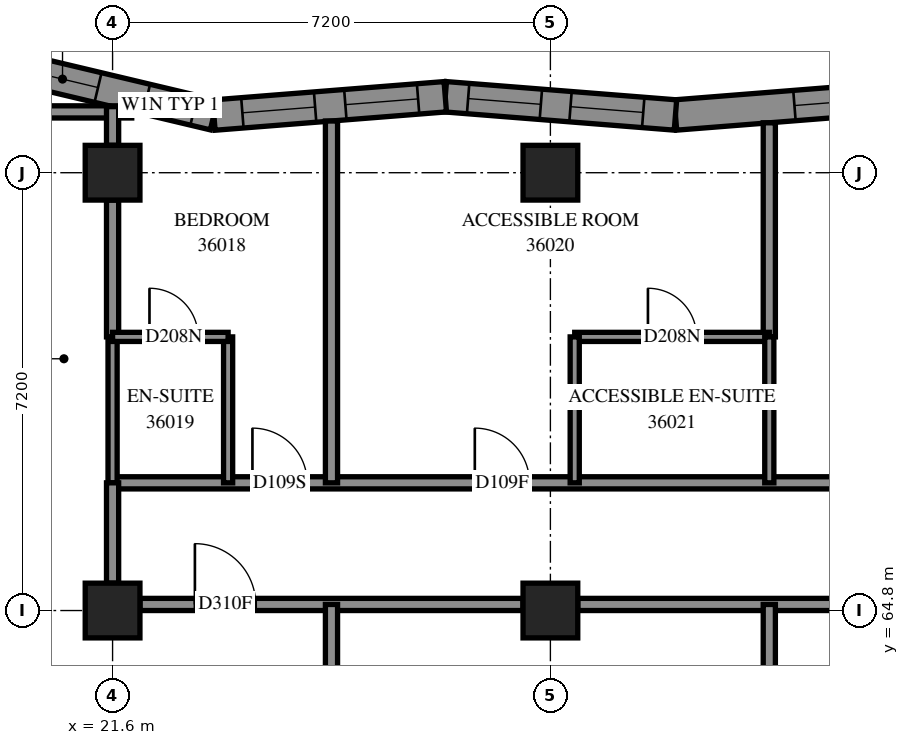
"""IFC4 building model, lengths in metres.
Left out: names, types, materials, properties, quantities, classifications, styles, units other than length and angle.
Written with IfcOpenShell. Run it as: python <this file> out.ifc"""

import sys

from ifc_helpers import new_model, si_unit, direction, frame, frame_2d, origin, origin_2d, place, context, subcontext, project, spatial, polyline, rectangle, outline, extrude, element, fill, save


model = new_model("IFC4")
c1 = context("Model", 3, precision=1e-05, world=origin(), true_north=direction((0.0, 1.0)))
c2 = subcontext(c1, "Body", "Model", "MODEL_VIEW")
j1 = project(units=[si_unit("LENGTHUNIT", "METRE"), si_unit("PLANEANGLEUNIT", "RADIAN")], contexts=[c1])
p1 = place(None, origin())
s1 = spatial("IfcSite", under=j1, at=p1, CompositionType="ELEMENT")
p2 = place(p1, origin())
s2 = spatial("IfcBuilding", under=s1, at=p2, CompositionType="ELEMENT")
p3 = place(p2, frame((0.0, 0.0, 135.4)))
s3 = spatial("IfcBuildingStorey", under=s2, at=p3, CompositionType="ELEMENT", Elevation=135.4)
for number, where, z_axis, x_axis in (
    (1, (21.6, 64.8, 0.0), (0.0, 0.0, 1.0), (1.0, 0.0, 0.0)),
    (2, (21.6, 72.0, 0.0), (0.0, 0.0, 1.0), (1.0, 0.0, 0.0)),
    (3, (28.8, 64.8, 0.0), (0.0, 0.0, 1.0), (1.0, 0.0, 0.0)),
    (4, (28.8, 72.0, 0.0), (0.0, 0.0, 1.0), (1.0, 0.0, 0.0)),
):
    element("IfcColumn", number, at=place(p3, frame(where, z_axis=z_axis, x_axis=x_axis)), inside=s3, PredefinedType="COLUMN", context=c2, shape_type="SweptSolid", body=[
        extrude(rectangle(XDim=0.9, YDim=0.9, at=origin_2d()), origin(), (0.0, 0.0, 1.0), 3.1),
    ])
p4 = place(p3, frame((34.642, 73.249, 0.0), z_axis=(0.0, 0.0, 1.0), x_axis=(-0.9968746163, -0.078999996, 0.0)))
e5 = element("IfcWall", 5, at=p4, inside=s3, PredefinedType="SOLIDWALL", context=c2, shape_type="SweptSolid", body=[
    extrude(outline(polyline([(-0.02, -0.25), (3.778, -0.25), (3.817, 0.25), (0.02, 0.25), (-0.02, -0.25)])), origin(), (0.0, 0.0, 1.0), 3.1),
])
p5 = place(p4, frame((0.635, 0.0, 0.45)))
e6 = element("IfcOpeningElement", 6, at=p5, cuts=e5, PredefinedType="OPENING", context=c2, shape_type="SweptSolid", body=[
    extrude(rectangle(XDim=1.2, YDim=2.5, at=frame_2d((0.6, 1.25))), frame((0.0, 0.26, 0.0), z_axis=(0.0, -1.0, 0.0), x_axis=(1.0, 0.0, 0.0)), (0.0, 0.0, 1.0), 0.52),
])
p6 = place(p3, frame((30.857, 72.949, 0.0), z_axis=(0.0, 0.0, 1.0), x_axis=(-0.9968747806, 0.0789979222, 0.0)))
e7 = element("IfcWall", 7, at=p6, inside=s3, PredefinedType="SOLIDWALL", context=c2, shape_type="SweptSolid", body=[
    extrude(outline(polyline([(0.02, -0.25), (3.817, -0.25), (3.778, 0.25), (-0.02, 0.25), (0.02, -0.25)])), origin(), (0.0, 0.0, 1.0), 3.1),
])
p7 = place(p6, frame((0.532, 0.0, 0.45)))
e8 = element("IfcOpeningElement", 8, at=p7, cuts=e7, PredefinedType="OPENING", context=c2, shape_type="SweptSolid", body=[
    extrude(rectangle(XDim=1.2, YDim=2.5, at=frame_2d((0.6, 1.25))), frame((0.0, 0.26, 0.0), z_axis=(0.0, -1.0, 0.0), x_axis=(1.0, 0.0, 0.0)), (0.0, 0.0, 1.0), 0.52),
])
p8 = place(p6, frame((2.22, 0.0, 0.45)))
e9 = element("IfcOpeningElement", 9, at=p8, cuts=e7, PredefinedType="OPENING", context=c2, shape_type="SweptSolid", body=[
    extrude(rectangle(XDim=1.2, YDim=2.5, at=frame_2d((0.6, 1.25))), frame((0.0, 0.26, 0.0), z_axis=(0.0, -1.0, 0.0), x_axis=(1.0, 0.0, 0.0)), (0.0, 0.0, 1.0), 0.52),
])
p9 = place(p3, frame((27.071, 73.249, 0.0), z_axis=(0.0, 0.0, 1.0), x_axis=(-0.9968755515, -0.0789881945, 0.0)))
e10 = element("IfcWall", 10, at=p9, inside=s3, PredefinedType="SOLIDWALL", context=c2, shape_type="SweptSolid", body=[
    extrude(outline(polyline([(-0.02, -0.25), (3.778, -0.25), (3.856, 0.25), (0.02, 0.25), (-0.02, -0.25)])), origin(), (0.0, 0.0, 1.0), 3.1),
])
p10 = place(p9, frame((0.449, 0.0, 0.45)))
e11 = element("IfcOpeningElement", 11, at=p10, cuts=e10, PredefinedType="OPENING", context=c2, shape_type="SweptSolid", body=[
    extrude(rectangle(XDim=1.2, YDim=2.5, at=frame_2d((0.6, 1.25))), frame((0.0, 0.26, 0.0), z_axis=(0.0, -1.0, 0.0), x_axis=(1.0, 0.0, 0.0)), (0.0, 0.0, 1.0), 0.52),
])
p11 = place(p9, frame((2.147, 0.0, 0.45)))
e12 = element("IfcOpeningElement", 12, at=p11, cuts=e10, PredefinedType="OPENING", context=c2, shape_type="SweptSolid", body=[
    extrude(rectangle(XDim=1.2, YDim=2.5, at=frame_2d((0.6, 1.25))), frame((0.0, 0.26, 0.0), z_axis=(0.0, -1.0, 0.0), x_axis=(1.0, 0.0, 0.0)), (0.0, 0.0, 1.0), 0.52),
])
p12 = place(p3, frame((23.266, 72.948, 0.0), z_axis=(0.0, 0.0, 1.0), x_axis=(-0.9728851289, 0.2312888368, 0.0)))
e13 = element("IfcWall", 13, at=p12, inside=s3, PredefinedType="SOLIDWALL", context=c2, shape_type="SweptSolid", body=[
    extrude(outline(polyline([(0.039, -0.25), (3.93, -0.25), (3.298, 0.25), (-0.039, 0.25), (0.039, -0.25)])), origin(), (0.0, 0.0, 1.0), 3.1),
])
p13 = place(p12, frame((0.338, 0.0, 0.45)))
e14 = element("IfcOpeningElement", 14, at=p13, cuts=e13, PredefinedType="OPENING", context=c2, shape_type="SweptSolid", body=[
    extrude(rectangle(XDim=0.8, YDim=2.5, at=frame_2d((0.4, 1.25))), frame((0.0, 0.26, 0.0), z_axis=(0.0, -1.0, 0.0), x_axis=(1.0, 0.0, 0.0)), (0.0, 0.0, 1.0), 0.52),
])
p14 = place(p12, frame((1.959, 0.0, 0.5)))
e15 = element("IfcOpeningElement", 15, at=p14, cuts=e13, PredefinedType="OPENING", context=c2, shape_type="SweptSolid", body=[
    extrude(rectangle(XDim=1.2, YDim=2.45, at=frame_2d((0.6, 1.225))), frame((0.0, 0.26, 0.0), z_axis=(0.0, -1.0, 0.0), x_axis=(1.0, 0.0, 0.0)), (0.0, 0.0, 1.0), 0.52),
])
p15 = place(p3, frame((21.6, 66.9, 0.0), z_axis=(0.0, 0.0, 1.0), x_axis=(1.0, 0.0, 0.0)))
e16 = element("IfcWall", 16, at=p15, inside=s3, PredefinedType="PARTITIONING", context=c2, shape_type="SweptSolid", body=[
    extrude(rectangle(XDim=19.0, YDim=0.2, at=frame_2d((9.5, 0.0))), origin(), (0.0, 0.0, 1.0), 3.1),
])
p16 = place(p15, frame((2.3, 0.0, 0.0)))
e17 = element("IfcOpeningElement", 17, at=p16, cuts=e16, PredefinedType="OPENING", context=c2, shape_type="SweptSolid", body=[
    extrude(rectangle(XDim=0.9, YDim=2.1, at=frame_2d((0.45, 1.05))), frame((0.0, 0.11, 0.0), z_axis=(0.0, -1.0, 0.0), x_axis=(1.0, 0.0, 0.0)), (0.0, 0.0, 1.0), 0.22),
])
p17 = place(p15, frame((5.957, 0.0, 0.0)))
e18 = element("IfcOpeningElement", 18, at=p17, cuts=e16, PredefinedType="OPENING", context=c2, shape_type="SweptSolid", body=[
    extrude(rectangle(XDim=0.9, YDim=2.1, at=frame_2d((0.45, 1.05))), frame((0.0, 0.11, 0.0), z_axis=(0.0, -1.0, 0.0), x_axis=(1.0, 0.0, 0.0)), (0.0, 0.0, 1.0), 0.22),
])
p18 = place(p15, frame((13.057, 0.0, 0.0)))
e19 = element("IfcOpeningElement", 19, at=p18, cuts=e16, PredefinedType="OPENING", context=c2, shape_type="SweptSolid", body=[
    extrude(rectangle(XDim=0.9, YDim=2.1, at=frame_2d((0.45, 1.05))), frame((0.0, 0.11, 0.0), z_axis=(0.0, -1.0, 0.0), x_axis=(1.0, 0.0, 0.0)), (0.0, 0.0, 1.0), 0.22),
])
p19 = place(p3, frame((22.05, 64.9, 0.0), z_axis=(0.0, 0.0, 1.0), x_axis=(1.0, 0.0, 0.0)))
e20 = element("IfcWall", 20, at=p19, inside=s3, PredefinedType="PARTITIONING", context=c2, shape_type="SweptSolid", body=[
    extrude(rectangle(XDim=6.3, YDim=0.2, at=frame_2d((3.15, 0.0))), origin(), (0.0, 0.0, 1.0), 2.6),
])
p20 = place(p19, frame((0.904, 0.0, 0.0)))
e21 = element("IfcOpeningElement", 21, at=p20, cuts=e20, PredefinedType="OPENING", context=c2, shape_type="SweptSolid", body=[
    extrude(rectangle(XDim=1.0, YDim=2.1, at=frame_2d((0.5, 1.05))), frame((0.0, 0.11, 0.0), z_axis=(0.0, -1.0, 0.0), x_axis=(1.0, 0.0, 0.0)), (0.0, 0.0, 1.0), 0.22),
])
p21 = place(p3, frame((29.25, 64.9, 0.0), z_axis=(0.0, 0.0, 1.0), x_axis=(1.0, 0.0, 0.0)))
e22 = element("IfcWall", 22, at=p21, inside=s3, PredefinedType="PARTITIONING", context=c2, shape_type="SweptSolid", body=[
    extrude(rectangle(XDim=6.3, YDim=0.2, at=frame_2d((3.15, 0.0))), origin(), (0.0, 0.0, 1.0), 2.6),
])
p22 = place(p21, frame((4.86, 0.0, 0.0)))
e23 = element("IfcOpeningElement", 23, at=p22, cuts=e22, PredefinedType="OPENING", context=c2, shape_type="SweptSolid", body=[
    extrude(rectangle(XDim=1.0, YDim=2.1, at=frame_2d((0.5, 1.05))), frame((0.0, 0.11, 0.0), z_axis=(0.0, -1.0, 0.0), x_axis=(1.0, 0.0, 0.0)), (0.0, 0.0, 1.0), 0.22),
])
p23 = place(p3, frame((25.2, 66.9, 0.0), z_axis=(0.0, 0.0, 1.0), x_axis=(0.0, 1.0, 0.0)))
e24 = element("IfcWall", 24, at=p23, inside=s3, PredefinedType="PARTITIONING", context=c2, shape_type="SweptSolid", body=[
    extrude(rectangle(XDim=5.95, YDim=0.2, at=frame_2d((2.975, 0.0))), origin(), (0.0, 0.0, 1.0), 3.1),
])
p24 = place(p3, frame((32.4, 69.3, 0.0), z_axis=(0.0, 0.0, 1.0), x_axis=(0.0, 1.0, 0.0)))
e25 = element("IfcWall", 25, at=p24, inside=s3, PredefinedType="PARTITIONING", context=c2, shape_type="SweptSolid", body=[
    extrude(rectangle(XDim=3.521, YDim=0.2, at=frame_2d((1.76, 0.0))), origin(), (0.0, 0.0, 1.0), 3.1),
])
p25 = place(p3, frame((29.2, 69.3, 0.0), z_axis=(0.0, 0.0, 1.0), x_axis=(1.0, 0.0, 0.0)))
e26 = element("IfcWall", 26, at=p25, inside=s3, PredefinedType="PARTITIONING", context=c2, shape_type="SweptSolid", body=[
    extrude(rectangle(XDim=3.2, YDim=0.15, at=frame_2d((1.6, 0.0))), origin(), (0.0, 0.0, 1.0), 3.1),
])
p26 = place(p25, frame((1.204, 0.0, 0.0)))
e27 = element("IfcOpeningElement", 27, at=p26, cuts=e26, PredefinedType="OPENING", context=c2, shape_type="SweptSolid", body=[
    extrude(rectangle(XDim=0.8, YDim=2.1, at=frame_2d((0.4, 1.05))), frame((0.0, 0.085, 0.0), z_axis=(0.0, -1.0, 0.0), x_axis=(1.0, 0.0, 0.0)), (0.0, 0.0, 1.0), 0.17),
])
p27 = place(p3, frame((21.6, 66.9, 0.0), z_axis=(0.0, 0.0, 1.0), x_axis=(0.0, 1.0, 0.0)))
e28 = element("IfcWall", 28, at=p27, inside=s3, PredefinedType="PARTITIONING", context=c2, shape_type="SweptSolid", body=[
    extrude(rectangle(XDim=2.4, YDim=0.15, at=frame_2d((1.2, 0.0))), origin(), (0.0, 0.0, 1.0), 2.6),
])
for number, where, z_axis, x_axis in (
    (29, (23.5, 66.9, 0.0), (0.0, 0.0, 1.0), (0.0, 1.0, 0.0)),
    (30, (29.2, 66.9, 0.0), (0.0, 0.0, 1.0), (0.0, 1.0, 0.0)),
    (31, (32.4, 66.9, 0.0), (0.0, 0.0, 1.0), (0.0, 1.0, 0.0)),
):
    element("IfcWall", number, at=place(p3, frame(where, z_axis=z_axis, x_axis=x_axis)), inside=s3, PredefinedType="PARTITIONING", context=c2, shape_type="SweptSolid", body=[
        extrude(rectangle(XDim=2.4, YDim=0.15, at=frame_2d((1.2, 0.0))), origin(), (0.0, 0.0, 1.0), 3.1),
    ])
p28 = place(p3, frame((21.6, 69.3, 0.0), z_axis=(0.0, 0.0, 1.0), x_axis=(0.0, 1.0, 0.0)))
e32 = element("IfcWall", 32, at=p28, inside=s3, PredefinedType="PARTITIONING", context=c2, shape_type="SweptSolid", body=[
    extrude(rectangle(XDim=2.25, YDim=0.2, at=frame_2d((1.125, 0.0))), origin(), (0.0, 0.0, 1.0), 2.6),
])
p29 = place(p3, frame((21.6, 69.3, 0.0), z_axis=(0.0, 0.0, 1.0), x_axis=(1.0, 0.0, 0.0)))
e33 = element("IfcWall", 33, at=p29, inside=s3, PredefinedType="PARTITIONING", context=c2, shape_type="SweptSolid", body=[
    extrude(rectangle(XDim=1.9, YDim=0.15, at=frame_2d((0.95, 0.0))), origin(), (0.0, 0.0, 1.0), 3.1),
])
p30 = place(p29, frame((0.607, 0.0, 0.0)))
e34 = element("IfcOpeningElement", 34, at=p30, cuts=e33, PredefinedType="OPENING", context=c2, shape_type="SweptSolid", body=[
    extrude(rectangle(XDim=0.8, YDim=2.1, at=frame_2d((0.4, 1.05))), frame((0.0, 0.085, 0.0), z_axis=(0.0, -1.0, 0.0), x_axis=(1.0, 0.0, 0.0)), (0.0, 0.0, 1.0), 0.17),
])
p31 = place(p3, frame((20.0, 73.0, 0.0), z_axis=(0.0, 0.0, 1.0), x_axis=(1.0, 0.0, 0.0)))
e35 = element("IfcWall", 35, at=p31, inside=s3, PredefinedType="PARTITIONING", context=c2, shape_type="SweptSolid", body=[
    extrude(rectangle(XDim=1.915, YDim=0.2, at=frame_2d((0.958, 0.0))), origin(), (0.0, 0.0, 1.0), 3.1),
])
p32 = place(p3, frame((21.6, 65.25, 0.0), z_axis=(0.0, 0.0, 1.0), x_axis=(0.0, 1.0, 0.0)))
e36 = element("IfcWall", 36, at=p32, inside=s3, PredefinedType="PARTITIONING", context=c2, shape_type="SweptSolid", body=[
    extrude(rectangle(XDim=1.65, YDim=0.2, at=frame_2d((0.825, 0.0))), origin(), (0.0, 0.0, 1.0), 2.6),
])
for number, where, z_axis, x_axis in (
    (37, (25.2, 63.2, 0.0), (0.0, 0.0, 1.0), (0.0, 1.0, 0.0)),
    (38, (32.4, 63.2, 0.0), (0.0, 0.0, 1.0), (0.0, 1.0, 0.0)),
):
    element("IfcWall", number, at=place(p3, frame(where, z_axis=z_axis, x_axis=x_axis)), inside=s3, PredefinedType="PARTITIONING", context=c2, shape_type="SweptSolid", body=[
        extrude(rectangle(XDim=1.7, YDim=0.2, at=frame_2d((0.85, 0.0))), origin(), (0.0, 0.0, 1.0), 3.1),
    ])
p33 = place(p3, frame((21.6, 72.45, 0.0), z_axis=(0.0, 0.0, 1.0), x_axis=(0.0, 1.0, 0.0)))
e39 = element("IfcWall", 39, at=p33, inside=s3, PredefinedType="PARTITIONING", context=c2, shape_type="SweptSolid", body=[
    extrude(rectangle(XDim=0.637, YDim=0.2, at=frame_2d((0.318, 0.0))), origin(), (0.0, 0.0, 1.0), 3.1),
])
p34 = place(p5, origin())
e40 = element("IfcWindow", 40, at=p34, inside=s3, PartitioningType="SINGLE_PANEL", PredefinedType="WINDOW", context=c2, shape_type="SweptSolid", body=[
    extrude(rectangle(XDim=1.2, YDim=2.5, at=frame_2d((0.6, 1.25))), frame((0.0, 0.18, 0.0), z_axis=(0.0, -1.0, 0.0), x_axis=(1.0, 0.0, 0.0)), (0.0, 0.0, 1.0), 0.06),
])
fill(e6, e40)
p35 = place(p7, origin())
e41 = element("IfcWindow", 41, at=p35, inside=s3, PartitioningType="SINGLE_PANEL", PredefinedType="WINDOW", context=c2, shape_type="SweptSolid", body=[
    extrude(rectangle(XDim=1.2, YDim=2.5, at=frame_2d((0.6, 1.25))), frame((0.0, 0.18, 0.0), z_axis=(0.0, -1.0, 0.0), x_axis=(1.0, 0.0, 0.0)), (0.0, 0.0, 1.0), 0.06),
])
fill(e8, e41)
p36 = place(p8, origin())
e42 = element("IfcWindow", 42, at=p36, inside=s3, PartitioningType="SINGLE_PANEL", PredefinedType="WINDOW", context=c2, shape_type="SweptSolid", body=[
    extrude(rectangle(XDim=1.2, YDim=2.5, at=frame_2d((0.6, 1.25))), frame((0.0, 0.18, 0.0), z_axis=(0.0, -1.0, 0.0), x_axis=(1.0, 0.0, 0.0)), (0.0, 0.0, 1.0), 0.06),
])
fill(e9, e42)
p37 = place(p10, origin())
e43 = element("IfcWindow", 43, at=p37, inside=s3, PartitioningType="SINGLE_PANEL", PredefinedType="WINDOW", context=c2, shape_type="SweptSolid", body=[
    extrude(rectangle(XDim=1.2, YDim=2.5, at=frame_2d((0.6, 1.25))), frame((0.0, 0.18, 0.0), z_axis=(0.0, -1.0, 0.0), x_axis=(1.0, 0.0, 0.0)), (0.0, 0.0, 1.0), 0.06),
])
fill(e11, e43)
p38 = place(p11, origin())
e44 = element("IfcWindow", 44, at=p38, inside=s3, PartitioningType="SINGLE_PANEL", PredefinedType="WINDOW", context=c2, shape_type="SweptSolid", body=[
    extrude(rectangle(XDim=1.2, YDim=2.5, at=frame_2d((0.6, 1.25))), frame((0.0, 0.18, 0.0), z_axis=(0.0, -1.0, 0.0), x_axis=(1.0, 0.0, 0.0)), (0.0, 0.0, 1.0), 0.06),
])
fill(e12, e44)
p39 = place(p20, origin())
e45 = element("IfcDoor", 45, at=p39, inside=s3, OperationType="SINGLE_SWING_RIGHT", PredefinedType="DOOR", context=c2, shape_type="SweptSolid", body=[
    extrude(rectangle(XDim=1.0, YDim=2.1, at=frame_2d((0.5, 1.05))), frame((0.0, 0.025, 0.0), z_axis=(0.0, -1.0, 0.0), x_axis=(1.0, 0.0, 0.0)), (0.0, 0.0, 1.0), 0.05),
])
fill(e21, e45)
p40 = place(p16, origin())
e46 = element("IfcDoor", 46, at=p40, inside=s3, OperationType="SINGLE_SWING_RIGHT", PredefinedType="DOOR", context=c2, shape_type="SweptSolid", body=[
    extrude(rectangle(XDim=0.9, YDim=2.1, at=frame_2d((0.45, 1.05))), frame((0.0, 0.025, 0.0), z_axis=(0.0, -1.0, 0.0), x_axis=(1.0, 0.0, 0.0)), (0.0, 0.0, 1.0), 0.05),
])
fill(e17, e46)
p41 = place(p30, origin())
e47 = element("IfcDoor", 47, at=p41, inside=s3, OperationType="SINGLE_SWING_RIGHT", PredefinedType="DOOR", context=c2, shape_type="SweptSolid", body=[
    extrude(rectangle(XDim=0.8, YDim=2.1, at=frame_2d((0.4, 1.05))), frame((0.0, 0.025, 0.0), z_axis=(0.0, -1.0, 0.0), x_axis=(1.0, 0.0, 0.0)), (0.0, 0.0, 1.0), 0.05),
])
fill(e34, e47)
p42 = place(p17, origin())
e48 = element("IfcDoor", 48, at=p42, inside=s3, OperationType="SINGLE_SWING_LEFT", PredefinedType="DOOR", context=c2, shape_type="SweptSolid", body=[
    extrude(rectangle(XDim=0.9, YDim=2.1, at=frame_2d((0.45, 1.05))), frame((0.0, 0.025, 0.0), z_axis=(0.0, -1.0, 0.0), x_axis=(1.0, 0.0, 0.0)), (0.0, 0.0, 1.0), 0.05),
])
fill(e18, e48)
p43 = place(p26, origin())
e49 = element("IfcDoor", 49, at=p43, inside=s3, OperationType="SINGLE_SWING_RIGHT", PredefinedType="DOOR", context=c2, shape_type="SweptSolid", body=[
    extrude(rectangle(XDim=0.8, YDim=2.1, at=frame_2d((0.4, 1.05))), frame((0.0, 0.025, 0.0), z_axis=(0.0, -1.0, 0.0), x_axis=(1.0, 0.0, 0.0)), (0.0, 0.0, 1.0), 0.05),
])
fill(e27, e49)
p44 = place(p13, origin())
e50 = element("IfcWindow", 50, at=p44, inside=s3, PartitioningType="SINGLE_PANEL", PredefinedType="WINDOW", context=c2, shape_type="SweptSolid", body=[
    extrude(rectangle(XDim=0.8, YDim=2.5, at=frame_2d((0.4, 1.25))), frame((0.0, 0.18, 0.0), z_axis=(0.0, -1.0, 0.0), x_axis=(1.0, 0.0, 0.0)), (0.0, 0.0, 1.0), 0.06),
])
fill(e14, e50)
p45 = place(p14, origin())
e51 = element("IfcWindow", 51, at=p45, inside=s3, PartitioningType="SINGLE_PANEL", PredefinedType="WINDOW", context=c2, shape_type="SweptSolid", body=[
    extrude(rectangle(XDim=1.2, YDim=2.45, at=frame_2d((0.6, 1.225))), frame((0.0, 0.18, 0.0), z_axis=(0.0, -1.0, 0.0), x_axis=(1.0, 0.0, 0.0)), (0.0, 0.0, 1.0), 0.06),
])
fill(e15, e51)
save(model, sys.argv[1])
